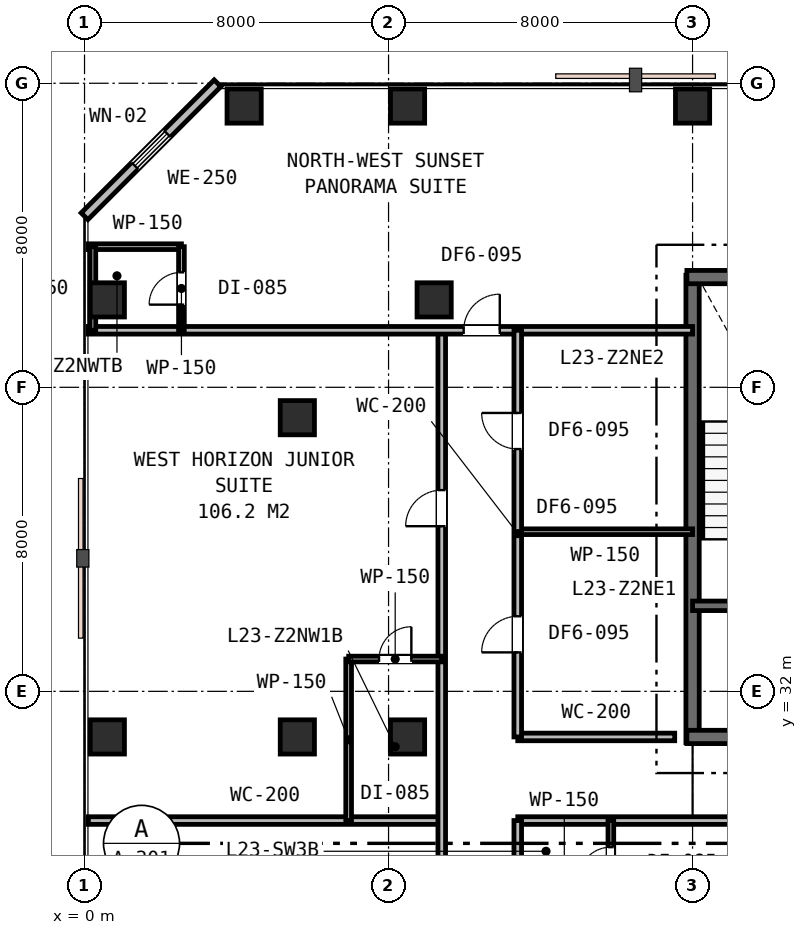
"""IFC4 building model, lengths in metres.
Left out: names, types, materials, properties, quantities, classifications, styles, units other than length and angle.
Written with IfcOpenShell. Run it as: python <this file> out.ifc"""

import sys

from ifc_helpers import new_model, si_unit, direction, frame, frame_2d, origin, origin_2d, place, context, subcontext, project, spatial, rectangle, extrude, element, fill, save


model = new_model("IFC4")
c1 = context("Model", 3, precision=1e-05, world=origin(), true_north=direction((0.0, 1.0)))
c2 = subcontext(c1, "Body", "Model", "MODEL_VIEW")
j1 = project(units=[si_unit("LENGTHUNIT", "METRE"), si_unit("PLANEANGLEUNIT", "RADIAN")], contexts=[c1])
p1 = place(None, origin())
s1 = spatial("IfcSite", under=j1, at=p1, CompositionType="ELEMENT")
p2 = place(p1, origin())
s2 = spatial("IfcBuilding", under=s1, at=p2, CompositionType="ELEMENT")
p3 = place(p2, frame((0.0, 0.0, 93.6)))
s3 = spatial("IfcBuildingStorey", under=s2, at=p3, CompositionType="ELEMENT", Elevation=93.6)
p4 = place(p3, frame((16.0, 30.65, 0.0), z_axis=(0.0, 0.0, 1.0), x_axis=(0.0, 1.0, 0.0)))
e1 = element("IfcWall", 1, at=p4, inside=s3, PredefinedType="SHEAR", context=c2, shape_type="SweptSolid", body=[
    extrude(rectangle(XDim=12.3, YDim=0.35, at=frame_2d((6.15, 0.0))), origin(), (0.0, 0.0, 1.0), 3.6),
])
p5 = place(p3, frame((15.85, 42.9, 0.0), z_axis=(0.0, 0.0, 1.0), x_axis=(1.0, 0.0, 0.0)))
e2 = element("IfcWall", 2, at=p5, inside=s3, PredefinedType="SHEAR", context=c2, shape_type="SweptSolid", body=[
    extrude(rectangle(XDim=24.3, YDim=0.35, at=frame_2d((12.15, 0.0))), origin(), (0.0, 0.0, 1.0), 3.6),
])
p6 = place(p3, frame((15.85, 30.8, 0.0), z_axis=(0.0, 0.0, 1.0), x_axis=(1.0, 0.0, 0.0)))
e3 = element("IfcWall", 3, at=p6, inside=s3, PredefinedType="SHEAR", context=c2, shape_type="SweptSolid", body=[
    extrude(rectangle(XDim=11.2, YDim=0.35, at=frame_2d((5.6, 0.0))), origin(), (0.0, 0.0, 1.0), 3.6),
])
p7 = place(p6, frame((2.45, 0.0, 0.0)))
e4 = element("IfcOpeningElement", 4, at=p7, cuts=e3, PredefinedType="OPENING", context=c2, shape_type="SweptSolid", body=[
    extrude(rectangle(XDim=1.1, YDim=2.15, at=frame_2d((0.55, 1.075))), frame((0.0, 0.185, 0.0), z_axis=(0.0, -1.0, 0.0), x_axis=(1.0, 0.0, 0.0)), (0.0, 0.0, 1.0), 0.37),
])
p8 = place(p3, frame((16.0, 34.25, 0.0), z_axis=(0.0, 0.0, 1.0), x_axis=(1.0, 0.0, 0.0)))
e5 = element("IfcWall", 5, at=p8, inside=s3, PredefinedType="SHEAR", context=c2, shape_type="SweptSolid", body=[
    extrude(rectangle(XDim=6.05, YDim=0.25, at=frame_2d((3.025, 0.0))), origin(), (0.0, 0.0, 1.0), 3.6),
])
p9 = place(p8, frame((1.25, 0.0, 0.0)))
e6 = element("IfcOpeningElement", 6, at=p9, cuts=e5, PredefinedType="OPENING", context=c2, shape_type="SweptSolid", body=[
    extrude(rectangle(XDim=1.0, YDim=2.15, at=frame_2d((0.5, 1.075))), frame((0.0, 0.135, 0.0), z_axis=(0.0, -1.0, 0.0), x_axis=(1.0, 0.0, 0.0)), (0.0, 0.0, 1.0), 0.27),
])
p10 = place(p8, frame((4.2, 0.0, 0.0)))
e7 = element("IfcOpeningElement", 7, at=p10, cuts=e5, PredefinedType="OPENING", context=c2, shape_type="SweptSolid", body=[
    extrude(rectangle(XDim=1.1, YDim=2.15, at=frame_2d((0.55, 1.075))), frame((0.0, 0.135, 0.0), z_axis=(0.0, -1.0, 0.0), x_axis=(1.0, 0.0, 0.0)), (0.0, 0.0, 1.0), 0.27),
])
for number, where, z_axis, x_axis in (
    (8, (5.6, 30.8, 0.0), (0.0, 0.0, 1.0), (1.0, 0.0, 0.0)),
    (9, (5.6, 39.2, 0.0), (0.0, 0.0, 1.0), (1.0, 0.0, 0.0)),
    (10, (8.5, 30.8, 0.0), (0.0, 0.0, 1.0), (1.0, 0.0, 0.0)),
    (11, (9.2, 42.3, 0.0), (0.0, 0.0, 1.0), (1.0, 0.0, 0.0)),
    (12, (0.6, 30.8, 0.0), (0.0, 0.0, 1.0), (1.0, 0.0, 0.0)),
    (13, (0.6, 42.3, 0.0), (0.0, 0.0, 1.0), (1.0, 0.0, 0.0)),
    (14, (4.2, 47.4, 0.0), (0.0, 0.0, 1.0), (1.0, 0.0, 0.0)),
    (15, (8.5, 47.4, 0.0), (0.0, 0.0, 1.0), (1.0, 0.0, 0.0)),
    (16, (16.0, 47.4, 0.0), (0.0, 0.0, 1.0), (1.0, 0.0, 0.0)),
):
    element("IfcColumn", number, at=place(p3, frame(where, z_axis=z_axis, x_axis=x_axis)), inside=s3, PredefinedType="COLUMN", context=c2, shape_type="SweptSolid", body=[
        extrude(rectangle(XDim=0.9, YDim=0.9, at=origin_2d()), origin(), (0.0, 0.0, 1.0), 3.6),
    ])
p11 = place(p3, frame((3.5, 48.0, 0.0), z_axis=(0.0, 0.0, 1.0), x_axis=(-0.707106781187, -0.707106781187, 0.0)))
e17 = element("IfcWall", 17, at=p11, inside=s3, PredefinedType="STANDARD", context=c2, shape_type="SweptSolid", body=[
    extrude(rectangle(XDim=4.95, YDim=0.25, at=frame_2d((2.475, 0.0))), origin(), (0.0, 0.0, 1.0), 3.33),
])
p12 = place(p11, frame((1.875, 0.0, 0.85)))
e18 = element("IfcOpeningElement", 18, at=p12, cuts=e17, PredefinedType="OPENING", context=c2, shape_type="SweptSolid", body=[
    extrude(rectangle(XDim=1.2, YDim=1.6, at=frame_2d((0.6, 0.8))), frame((0.0, 0.135, 0.0), z_axis=(0.0, -1.0, 0.0), x_axis=(1.0, 0.0, 0.0)), (0.0, 0.0, 1.0), 0.27),
])
p13 = place(p3, frame((0.1, 28.6, 0.0), z_axis=(0.0, 0.0, 1.0), x_axis=(1.0, 0.0, 0.0)))
e19 = element("IfcWall", 19, at=p13, inside=s3, PredefinedType="PARTITIONING", context=c2, shape_type="SweptSolid", body=[
    extrude(rectangle(XDim=9.3, YDim=0.2, at=frame_2d((4.65, 0.0))), origin(), (0.0, 0.0, 1.0), 2.83),
])
p14 = place(p3, frame((11.4, 28.6, 0.0), z_axis=(0.0, 0.0, 1.0), x_axis=(1.0, 0.0, 0.0)))
e20 = element("IfcWall", 20, at=p14, inside=s3, PredefinedType="PARTITIONING", context=c2, shape_type="SweptSolid", body=[
    extrude(rectangle(XDim=32.8, YDim=0.2, at=frame_2d((16.4, 0.0))), origin(), (0.0, 0.0, 1.0), 2.83),
])
p15 = place(p14, frame((14.7, 0.0, 0.0)))
e21 = element("IfcOpeningElement", 21, at=p15, cuts=e20, PredefinedType="OPENING", context=c2, shape_type="SweptSolid", body=[
    extrude(rectangle(XDim=0.95, YDim=2.15, at=frame_2d((0.475, 1.075))), frame((0.0, 0.11, 0.0), z_axis=(0.0, -1.0, 0.0), x_axis=(1.0, 0.0, 0.0)), (0.0, 0.0, 1.0), 0.22),
])
p16 = place(p14, frame((22.475, 0.0, 0.0)))
e22 = element("IfcOpeningElement", 22, at=p16, cuts=e20, PredefinedType="OPENING", context=c2, shape_type="SweptSolid", body=[
    extrude(rectangle(XDim=0.95, YDim=2.15, at=frame_2d((0.475, 1.075))), frame((0.0, 0.11, 0.0), z_axis=(0.0, -1.0, 0.0), x_axis=(1.0, 0.0, 0.0)), (0.0, 0.0, 1.0), 0.22),
])
p17 = place(p14, frame((28.985, 0.0, 0.0)))
e23 = element("IfcOpeningElement", 23, at=p17, cuts=e20, PredefinedType="OPENING", context=c2, shape_type="SweptSolid", body=[
    extrude(rectangle(XDim=0.95, YDim=2.15, at=frame_2d((0.475, 1.075))), frame((0.0, 0.11, 0.0), z_axis=(0.0, -1.0, 0.0), x_axis=(1.0, 0.0, 0.0)), (0.0, 0.0, 1.0), 0.22),
])
p18 = place(p3, frame((11.4, 30.8, 0.0), z_axis=(0.0, 0.0, 1.0), x_axis=(1.0, 0.0, 0.0)))
e24 = element("IfcWall", 24, at=p18, inside=s3, PredefinedType="PARTITIONING", context=c2, shape_type="SweptSolid", body=[
    extrude(rectangle(XDim=4.13, YDim=0.2, at=frame_2d((2.065, 0.0))), origin(), (0.0, 0.0, 1.0), 2.83),
])
p19 = place(p3, frame((9.4, 10.6, 0.0), z_axis=(0.0, 0.0, 1.0), x_axis=(0.0, 1.0, 0.0)))
e25 = element("IfcWall", 25, at=p19, inside=s3, PredefinedType="PARTITIONING", context=c2, shape_type="SweptSolid", body=[
    extrude(rectangle(XDim=30.9, YDim=0.2, at=frame_2d((15.45, 0.0))), origin(), (0.0, 0.0, 1.0), 2.83),
])
p20 = place(p19, frame((8.679, 0.0, 0.0)))
e26 = element("IfcOpeningElement", 26, at=p20, cuts=e25, PredefinedType="OPENING", context=c2, shape_type="SweptSolid", body=[
    extrude(rectangle(XDim=0.95, YDim=2.15, at=frame_2d((0.475, 1.075))), frame((0.0, 0.11, 0.0), z_axis=(0.0, -1.0, 0.0), x_axis=(1.0, 0.0, 0.0)), (0.0, 0.0, 1.0), 0.22),
])
p21 = place(p19, frame((14.68, 0.0, 0.0)))
e27 = element("IfcOpeningElement", 27, at=p21, cuts=e25, PredefinedType="OPENING", context=c2, shape_type="SweptSolid", body=[
    extrude(rectangle(XDim=0.95, YDim=2.15, at=frame_2d((0.475, 1.075))), frame((0.0, 0.11, 0.0), z_axis=(0.0, -1.0, 0.0), x_axis=(1.0, 0.0, 0.0)), (0.0, 0.0, 1.0), 0.22),
])
p22 = place(p19, frame((4.273, 0.0, 0.0)))
e28 = element("IfcOpeningElement", 28, at=p22, cuts=e25, PredefinedType="OPENING", context=c2, shape_type="SweptSolid", body=[
    extrude(rectangle(XDim=0.95, YDim=2.15, at=frame_2d((0.475, 1.075))), frame((0.0, 0.11, 0.0), z_axis=(0.0, -1.0, 0.0), x_axis=(1.0, 0.0, 0.0)), (0.0, 0.0, 1.0), 0.22),
])
p23 = place(p19, frame((25.745, 0.0, 0.0)))
e29 = element("IfcOpeningElement", 29, at=p23, cuts=e25, PredefinedType="OPENING", context=c2, shape_type="SweptSolid", body=[
    extrude(rectangle(XDim=0.95, YDim=2.15, at=frame_2d((0.475, 1.075))), frame((0.0, 0.11, 0.0), z_axis=(0.0, -1.0, 0.0), x_axis=(1.0, 0.0, 0.0)), (0.0, 0.0, 1.0), 0.22),
])
p24 = place(p3, frame((0.1, 41.5, 0.0), z_axis=(0.0, 0.0, 1.0), x_axis=(1.0, 0.0, 0.0)))
e30 = element("IfcWall", 30, at=p24, inside=s3, PredefinedType="PARTITIONING", context=c2, shape_type="SweptSolid", body=[
    extrude(rectangle(XDim=15.9, YDim=0.2, at=frame_2d((7.95, 0.0))), origin(), (0.0, 0.0, 1.0), 2.83),
])
p25 = place(p24, frame((9.877, 0.0, 0.0)))
e31 = element("IfcOpeningElement", 31, at=p25, cuts=e30, PredefinedType="OPENING", context=c2, shape_type="SweptSolid", body=[
    extrude(rectangle(XDim=0.95, YDim=2.15, at=frame_2d((0.475, 1.075))), frame((0.0, 0.11, 0.0), z_axis=(0.0, -1.0, 0.0), x_axis=(1.0, 0.0, 0.0)), (0.0, 0.0, 1.0), 0.22),
])
p26 = place(p3, frame((0.1, 43.7, 0.0), z_axis=(0.0, 0.0, 1.0), x_axis=(1.0, 0.0, 0.0)))
e32 = element("IfcWall", 32, at=p26, inside=s3, PredefinedType="PARTITIONING", context=c2, shape_type="SweptSolid", body=[
    extrude(rectangle(XDim=2.45, YDim=0.15, at=frame_2d((1.225, 0.0))), origin(), (0.0, 0.0, 1.0), 3.33),
])
p27 = place(p3, frame((2.55, 41.5, 0.0), z_axis=(0.0, 0.0, 1.0), x_axis=(0.0, 1.0, 0.0)))
e33 = element("IfcWall", 33, at=p27, inside=s3, PredefinedType="PARTITIONING", context=c2, shape_type="SweptSolid", body=[
    extrude(rectangle(XDim=2.2, YDim=0.15, at=frame_2d((1.1, 0.0))), origin(), (0.0, 0.0, 1.0), 2.83),
])
p28 = place(p27, frame((0.675, 0.0, 0.0)))
e34 = element("IfcOpeningElement", 34, at=p28, cuts=e33, PredefinedType="OPENING", context=c2, shape_type="SweptSolid", body=[
    extrude(rectangle(XDim=0.85, YDim=2.15, at=frame_2d((0.425, 1.075))), frame((0.0, 0.085, 0.0), z_axis=(0.0, -1.0, 0.0), x_axis=(1.0, 0.0, 0.0)), (0.0, 0.0, 1.0), 0.17),
])
p29 = place(p3, frame((0.22, 41.5, 0.0), z_axis=(0.0, 0.0, 1.0), x_axis=(0.0, 1.0, 0.0)))
e35 = element("IfcWall", 35, at=p29, inside=s3, PredefinedType="PARTITIONING", context=c2, shape_type="SweptSolid", body=[
    extrude(rectangle(XDim=2.2, YDim=0.15, at=frame_2d((1.1, 0.0))), origin(), (0.0, 0.0, 1.0), 2.83),
])
p30 = place(p3, frame((6.95, 28.6, 0.0), z_axis=(0.0, 0.0, 1.0), x_axis=(0.0, 1.0, 0.0)))
e36 = element("IfcWall", 36, at=p30, inside=s3, PredefinedType="PARTITIONING", context=c2, shape_type="SweptSolid", body=[
    extrude(rectangle(XDim=4.25, YDim=0.15, at=frame_2d((2.125, 0.0))), origin(), (0.0, 0.0, 1.0), 2.83),
])
p31 = place(p3, frame((6.95, 32.85, 0.0), z_axis=(0.0, 0.0, 1.0), x_axis=(1.0, 0.0, 0.0)))
e37 = element("IfcWall", 37, at=p31, inside=s3, PredefinedType="PARTITIONING", context=c2, shape_type="SweptSolid", body=[
    extrude(rectangle(XDim=2.45, YDim=0.15, at=frame_2d((1.225, 0.0))), origin(), (0.0, 0.0, 1.0), 2.83),
])
p32 = place(p31, frame((0.8, 0.0, 0.0)))
e38 = element("IfcOpeningElement", 38, at=p32, cuts=e37, PredefinedType="OPENING", context=c2, shape_type="SweptSolid", body=[
    extrude(rectangle(XDim=0.85, YDim=2.15, at=frame_2d((0.425, 1.075))), frame((0.0, 0.085, 0.0), z_axis=(0.0, -1.0, 0.0), x_axis=(1.0, 0.0, 0.0)), (0.0, 0.0, 1.0), 0.17),
])
p33 = place(p3, frame((11.4, 36.2, 0.0), z_axis=(0.0, 0.0, 1.0), x_axis=(1.0, 0.0, 0.0)))
e39 = element("IfcWall", 39, at=p33, inside=s3, PredefinedType="PARTITIONING", context=c2, shape_type="SweptSolid", body=[
    extrude(rectangle(XDim=4.6, YDim=0.15, at=frame_2d((2.3, 0.0))), origin(), (0.0, 0.0, 1.0), 3.33),
])
p34 = place(p3, frame((11.4, 30.8, 0.0), z_axis=(0.0, 0.0, 1.0), x_axis=(0.0, 1.0, 0.0)))
e40 = element("IfcWall", 40, at=p34, inside=s3, PredefinedType="PARTITIONING", context=c2, shape_type="SweptSolid", body=[
    extrude(rectangle(XDim=10.7, YDim=0.2, at=frame_2d((5.35, 0.0))), origin(), (0.0, 0.0, 1.0), 2.83),
])
p35 = place(p34, frame((2.225, 0.0, 0.0)))
e41 = element("IfcOpeningElement", 41, at=p35, cuts=e40, PredefinedType="OPENING", context=c2, shape_type="SweptSolid", body=[
    extrude(rectangle(XDim=0.95, YDim=2.15, at=frame_2d((0.475, 1.075))), frame((0.0, 0.11, 0.0), z_axis=(0.0, -1.0, 0.0), x_axis=(1.0, 0.0, 0.0)), (0.0, 0.0, 1.0), 0.22),
])
p36 = place(p34, frame((7.575, 0.0, 0.0)))
e42 = element("IfcOpeningElement", 42, at=p36, cuts=e40, PredefinedType="OPENING", context=c2, shape_type="SweptSolid", body=[
    extrude(rectangle(XDim=0.95, YDim=2.15, at=frame_2d((0.475, 1.075))), frame((0.0, 0.11, 0.0), z_axis=(0.0, -1.0, 0.0), x_axis=(1.0, 0.0, 0.0)), (0.0, 0.0, 1.0), 0.22),
])
p37 = place(p3, frame((11.4, 10.6, 0.0), z_axis=(0.0, 0.0, 1.0), x_axis=(0.0, 1.0, 0.0)))
e43 = element("IfcWall", 43, at=p37, inside=s3, PredefinedType="PARTITIONING", context=c2, shape_type="SweptSolid", body=[
    extrude(rectangle(XDim=18.0, YDim=0.2, at=frame_2d((9.0, 0.0))), origin(), (0.0, 0.0, 1.0), 2.83),
])
p38 = place(p37, frame((1.29, 0.0, 0.0)))
e44 = element("IfcOpeningElement", 44, at=p38, cuts=e43, PredefinedType="OPENING", context=c2, shape_type="SweptSolid", body=[
    extrude(rectangle(XDim=0.95, YDim=2.15, at=frame_2d((0.475, 1.075))), frame((0.0, 0.11, 0.0), z_axis=(0.0, -1.0, 0.0), x_axis=(1.0, 0.0, 0.0)), (0.0, 0.0, 1.0), 0.22),
])
p39 = place(p37, frame((7.29, 0.0, 0.0)))
e45 = element("IfcOpeningElement", 45, at=p39, cuts=e43, PredefinedType="OPENING", context=c2, shape_type="SweptSolid", body=[
    extrude(rectangle(XDim=0.95, YDim=2.15, at=frame_2d((0.475, 1.075))), frame((0.0, 0.11, 0.0), z_axis=(0.0, -1.0, 0.0), x_axis=(1.0, 0.0, 0.0)), (0.0, 0.0, 1.0), 0.22),
])
p40 = place(p37, frame((13.29, 0.0, 0.0)))
e46 = element("IfcOpeningElement", 46, at=p40, cuts=e43, PredefinedType="OPENING", context=c2, shape_type="SweptSolid", body=[
    extrude(rectangle(XDim=0.95, YDim=2.15, at=frame_2d((0.475, 1.075))), frame((0.0, 0.11, 0.0), z_axis=(0.0, -1.0, 0.0), x_axis=(1.0, 0.0, 0.0)), (0.0, 0.0, 1.0), 0.22),
])
p41 = place(p3, frame((13.85, 26.35, 0.0), z_axis=(0.0, 0.0, 1.0), x_axis=(0.0, 1.0, 0.0)))
e47 = element("IfcWall", 47, at=p41, inside=s3, PredefinedType="PARTITIONING", context=c2, shape_type="SweptSolid", body=[
    extrude(rectangle(XDim=2.25, YDim=0.15, at=frame_2d((1.125, 0.0))), origin(), (0.0, 0.0, 1.0), 3.33),
])
p42 = place(p41, frame((0.7, 0.0, 0.0)))
e48 = element("IfcOpeningElement", 48, at=p42, cuts=e47, PredefinedType="OPENING", context=c2, shape_type="SweptSolid", body=[
    extrude(rectangle(XDim=0.85, YDim=2.15, at=frame_2d((0.425, 1.075))), frame((0.0, 0.085, 0.0), z_axis=(0.0, -1.0, 0.0), x_axis=(1.0, 0.0, 0.0)), (0.0, 0.0, 1.0), 0.17),
])
p43 = place(p12, origin())
e49 = element("IfcWindow", 49, at=p43, inside=s3, PartitioningType="SINGLE_PANEL", PredefinedType="WINDOW", context=c2, shape_type="SweptSolid", body=[
    extrude(rectangle(XDim=1.2, YDim=1.6, at=frame_2d((0.6, 0.8))), frame((0.0, 0.03, 0.0), z_axis=(0.0, -1.0, 0.0), x_axis=(1.0, 0.0, 0.0)), (0.0, 0.0, 1.0), 0.06),
])
fill(e18, e49)
p44 = place(p25, origin())
e50 = element("IfcDoor", 50, at=p44, inside=s3, OperationType="SINGLE_SWING_RIGHT", PredefinedType="DOOR", context=c2, shape_type="SweptSolid", body=[
    extrude(rectangle(XDim=0.95, YDim=2.15, at=frame_2d((0.475, 1.075))), frame((0.0, 0.025, 0.0), z_axis=(0.0, -1.0, 0.0), x_axis=(1.0, 0.0, 0.0)), (0.0, 0.0, 1.0), 0.05),
])
fill(e31, e50)
p45 = place(p28, origin())
e51 = element("IfcDoor", 51, at=p45, inside=s3, OperationType="SINGLE_SWING_LEFT", PredefinedType="DOOR", context=c2, shape_type="SweptSolid", body=[
    extrude(rectangle(XDim=0.85, YDim=2.15, at=frame_2d((0.425, 1.075))), frame((0.0, 0.025, 0.0), z_axis=(0.0, -1.0, 0.0), x_axis=(1.0, 0.0, 0.0)), (0.0, 0.0, 1.0), 0.05),
])
fill(e34, e51)
p46 = place(p23, origin())
e52 = element("IfcDoor", 52, at=p46, inside=s3, OperationType="SINGLE_SWING_LEFT", PredefinedType="DOOR", context=c2, shape_type="SweptSolid", body=[
    extrude(rectangle(XDim=0.95, YDim=2.15, at=frame_2d((0.475, 1.075))), frame((0.0, 0.025, 0.0), z_axis=(0.0, -1.0, 0.0), x_axis=(1.0, 0.0, 0.0)), (0.0, 0.0, 1.0), 0.05),
])
fill(e29, e52)
p47 = place(p32, origin())
e53 = element("IfcDoor", 53, at=p47, inside=s3, OperationType="SINGLE_SWING_RIGHT", PredefinedType="DOOR", context=c2, shape_type="SweptSolid", body=[
    extrude(rectangle(XDim=0.85, YDim=2.15, at=frame_2d((0.425, 1.075))), frame((0.0, 0.025, 0.0), z_axis=(0.0, -1.0, 0.0), x_axis=(1.0, 0.0, 0.0)), (0.0, 0.0, 1.0), 0.05),
])
fill(e38, e53)
p48 = place(p35, origin())
e54 = element("IfcDoor", 54, at=p48, inside=s3, OperationType="SINGLE_SWING_LEFT", PredefinedType="DOOR", context=c2, shape_type="SweptSolid", body=[
    extrude(rectangle(XDim=0.95, YDim=2.15, at=frame_2d((0.475, 1.075))), frame((0.0, 0.025, 0.0), z_axis=(0.0, -1.0, 0.0), x_axis=(1.0, 0.0, 0.0)), (0.0, 0.0, 1.0), 0.05),
])
fill(e41, e54)
p49 = place(p36, origin())
e55 = element("IfcDoor", 55, at=p49, inside=s3, OperationType="SINGLE_SWING_RIGHT", PredefinedType="DOOR", context=c2, shape_type="SweptSolid", body=[
    extrude(rectangle(XDim=0.95, YDim=2.15, at=frame_2d((0.475, 1.075))), frame((0.0, 0.025, 0.0), z_axis=(0.0, -1.0, 0.0), x_axis=(1.0, 0.0, 0.0)), (0.0, 0.0, 1.0), 0.05),
])
fill(e42, e55)
p50 = place(p42, origin())
e56 = element("IfcDoor", 56, at=p50, inside=s3, OperationType="SINGLE_SWING_LEFT", PredefinedType="DOOR", context=c2, shape_type="SweptSolid", body=[
    extrude(rectangle(XDim=0.85, YDim=2.15, at=frame_2d((0.425, 1.075))), frame((0.0, 0.025, 0.0), z_axis=(0.0, -1.0, 0.0), x_axis=(1.0, 0.0, 0.0)), (0.0, 0.0, 1.0), 0.05),
])
fill(e48, e56)
save(model, sys.argv[1])
